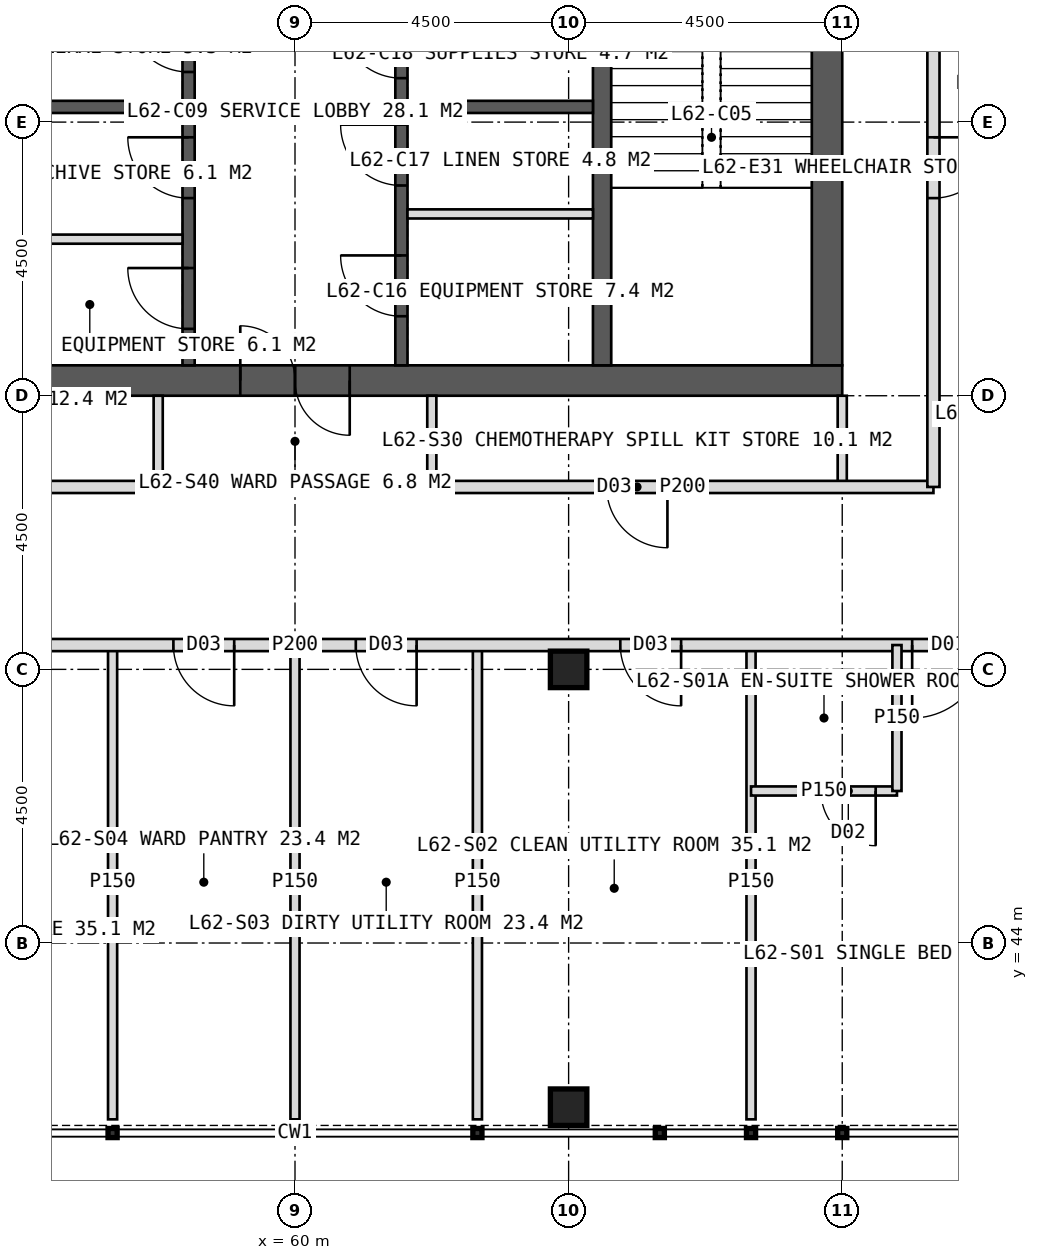
"""IFC4 building model, lengths in metres.
Left out: names, types, materials, properties, quantities, classifications, styles, units other than length and angle.
Written with IfcOpenShell. Run it as: python <this file> out.ifc"""

import sys

from ifc_helpers import new_model, si_unit, direction, frame, frame_2d, origin, origin_2d, place, context, subcontext, project, spatial, rectangle, hollow_rectangle, extrude, element, fill, save


model = new_model("IFC4")
c1 = context("Model", 3, precision=1e-05, world=origin(), true_north=direction((0.0, 1.0)))
c2 = subcontext(c1, "Body", "Model", "MODEL_VIEW")
j1 = project(units=[si_unit("LENGTHUNIT", "METRE"), si_unit("PLANEANGLEUNIT", "RADIAN")], contexts=[c1])
p1 = place(None, origin())
s1 = spatial("IfcSite", under=j1, at=p1, CompositionType="ELEMENT")
p2 = place(p1, origin())
s2 = spatial("IfcBuilding", under=s1, at=p2, CompositionType="ELEMENT")
p3 = place(p2, frame((0.0, 0.0, 258.0)))
s3 = spatial("IfcBuildingStorey", under=s2, at=p3, CompositionType="ELEMENT", Elevation=258.0)
p4 = place(p3, frame((51.0, 53.25, 0.0), z_axis=(0.0, 0.0, 1.0), x_axis=(1.0, 0.0, 0.0)))
e1 = element("IfcWall", 1, at=p4, inside=s3, PredefinedType="SHEAR", context=c2, shape_type="SweptSolid", body=[
    extrude(rectangle(XDim=18.0, YDim=0.5, at=frame_2d((9.0, 0.0))), origin(), (0.0, 0.0, 1.0), 4.0),
])
p5 = place(p4, frame((8.1, 0.0, 0.0)))
e2 = element("IfcOpeningElement", 2, at=p5, cuts=e1, PredefinedType="OPENING", context=c2, shape_type="SweptSolid", body=[
    extrude(rectangle(XDim=1.8, YDim=2.2, at=frame_2d((0.9, 1.1))), frame((0.0, 0.26, 0.0), z_axis=(0.0, -1.0, 0.0), x_axis=(1.0, 0.0, 0.0)), (0.0, 0.0, 1.0), 0.52),
])
p6 = place(p3, frame((68.75, 53.5, 0.0), z_axis=(0.0, 0.0, 1.0), x_axis=(0.0, 1.0, 0.0)))
e3 = element("IfcWall", 3, at=p6, inside=s3, PredefinedType="SHEAR", context=c2, shape_type="SweptSolid", body=[
    extrude(rectangle(XDim=17.0, YDim=0.5, at=frame_2d((8.5, 0.0))), origin(), (0.0, 0.0, 1.0), 4.0),
])
p7 = place(p6, frame((9.6, 0.0, 0.0)))
e4 = element("IfcOpeningElement", 4, at=p7, cuts=e3, PredefinedType="OPENING", context=c2, shape_type="SweptSolid", body=[
    extrude(rectangle(XDim=1.5, YDim=2.2, at=frame_2d((0.75, 1.1))), frame((0.0, 0.26, 0.0), z_axis=(0.0, -1.0, 0.0), x_axis=(1.0, 0.0, 0.0)), (0.0, 0.0, 1.0), 0.52),
])
p8 = place(p3, frame((65.05, 53.5, 0.0), z_axis=(0.0, 0.0, 1.0), x_axis=(0.0, 1.0, 0.0)))
e5 = element("IfcWall", 5, at=p8, inside=s3, PredefinedType="SHEAR", context=c2, shape_type="SweptSolid", body=[
    extrude(rectangle(XDim=17.0, YDim=0.3, at=frame_2d((8.5, 0.0))), origin(), (0.0, 0.0, 1.0), 4.0),
])
p9 = place(p3, frame((58.25, 53.5, 0.0), z_axis=(0.0, 0.0, 1.0), x_axis=(0.0, 1.0, 0.0)))
e6 = element("IfcWall", 6, at=p9, inside=s3, PredefinedType="SHEAR", context=c2, shape_type="SweptSolid", body=[
    extrude(rectangle(XDim=17.0, YDim=0.2, at=frame_2d((8.5, 0.0))), origin(), (0.0, 0.0, 1.0), 4.0),
])
p10 = place(p9, frame((0.6, 0.0, 0.0)))
e7 = element("IfcOpeningElement", 7, at=p10, cuts=e6, PredefinedType="OPENING", context=c2, shape_type="SweptSolid", body=[
    extrude(rectangle(XDim=1.0, YDim=2.1, at=frame_2d((0.5, 1.05))), frame((0.0, 0.11, 0.0), z_axis=(0.0, -1.0, 0.0), x_axis=(1.0, 0.0, 0.0)), (0.0, 0.0, 1.0), 0.22),
])
p11 = place(p9, frame((2.75, 0.0, 0.0)))
e8 = element("IfcOpeningElement", 8, at=p11, cuts=e6, PredefinedType="OPENING", context=c2, shape_type="SweptSolid", body=[
    extrude(rectangle(XDim=1.0, YDim=2.1, at=frame_2d((0.5, 1.05))), frame((0.0, 0.11, 0.0), z_axis=(0.0, -1.0, 0.0), x_axis=(1.0, 0.0, 0.0)), (0.0, 0.0, 1.0), 0.22),
])
p12 = place(p9, frame((4.824, 0.0, 0.0)))
e9 = element("IfcOpeningElement", 9, at=p12, cuts=e6, PredefinedType="OPENING", context=c2, shape_type="SweptSolid", body=[
    extrude(rectangle(XDim=1.0, YDim=2.1, at=frame_2d((0.5, 1.05))), frame((0.0, 0.11, 0.0), z_axis=(0.0, -1.0, 0.0), x_axis=(1.0, 0.0, 0.0)), (0.0, 0.0, 1.0), 0.22),
])
p13 = place(p9, frame((6.924, 0.0, 0.0)))
e10 = element("IfcOpeningElement", 10, at=p13, cuts=e6, PredefinedType="OPENING", context=c2, shape_type="SweptSolid", body=[
    extrude(rectangle(XDim=1.0, YDim=2.1, at=frame_2d((0.5, 1.05))), frame((0.0, 0.11, 0.0), z_axis=(0.0, -1.0, 0.0), x_axis=(1.0, 0.0, 0.0)), (0.0, 0.0, 1.0), 0.22),
])
p14 = place(p9, frame((10.025, 0.0, 0.0)))
e11 = element("IfcOpeningElement", 11, at=p14, cuts=e6, PredefinedType="OPENING", context=c2, shape_type="SweptSolid", body=[
    extrude(rectangle(XDim=1.4, YDim=2.2, at=frame_2d((0.7, 1.1))), frame((0.0, 0.11, 0.0), z_axis=(0.0, -1.0, 0.0), x_axis=(1.0, 0.0, 0.0)), (0.0, 0.0, 1.0), 0.22),
])
p15 = place(p9, frame((14.325, 0.0, 0.0)))
e12 = element("IfcOpeningElement", 12, at=p15, cuts=e6, PredefinedType="OPENING", context=c2, shape_type="SweptSolid", body=[
    extrude(rectangle(XDim=1.4, YDim=2.2, at=frame_2d((0.7, 1.1))), frame((0.0, 0.11, 0.0), z_axis=(0.0, -1.0, 0.0), x_axis=(1.0, 0.0, 0.0)), (0.0, 0.0, 1.0), 0.22),
])
p16 = place(p3, frame((61.75, 53.5, 0.0), z_axis=(0.0, 0.0, 1.0), x_axis=(0.0, 1.0, 0.0)))
e13 = element("IfcWall", 13, at=p16, inside=s3, PredefinedType="SHEAR", context=c2, shape_type="SweptSolid", body=[
    extrude(rectangle(XDim=17.0, YDim=0.2, at=frame_2d((8.5, 0.0))), origin(), (0.0, 0.0, 1.0), 4.0),
])
p17 = place(p16, frame((0.808, 0.0, 0.0)))
e14 = element("IfcOpeningElement", 14, at=p17, cuts=e13, PredefinedType="OPENING", context=c2, shape_type="SweptSolid", body=[
    extrude(rectangle(XDim=1.0, YDim=2.1, at=frame_2d((0.5, 1.05))), frame((0.0, 0.11, 0.0), z_axis=(0.0, -1.0, 0.0), x_axis=(1.0, 0.0, 0.0)), (0.0, 0.0, 1.0), 0.22),
])
p18 = place(p16, frame((2.958, 0.0, 0.0)))
e15 = element("IfcOpeningElement", 15, at=p18, cuts=e13, PredefinedType="OPENING", context=c2, shape_type="SweptSolid", body=[
    extrude(rectangle(XDim=1.0, YDim=2.1, at=frame_2d((0.5, 1.05))), frame((0.0, 0.11, 0.0), z_axis=(0.0, -1.0, 0.0), x_axis=(1.0, 0.0, 0.0)), (0.0, 0.0, 1.0), 0.22),
])
p19 = place(p16, frame((4.722, 0.0, 0.0)))
e16 = element("IfcOpeningElement", 16, at=p19, cuts=e13, PredefinedType="OPENING", context=c2, shape_type="SweptSolid", body=[
    extrude(rectangle(XDim=1.0, YDim=2.1, at=frame_2d((0.5, 1.05))), frame((0.0, 0.11, 0.0), z_axis=(0.0, -1.0, 0.0), x_axis=(1.0, 0.0, 0.0)), (0.0, 0.0, 1.0), 0.22),
])
p20 = place(p16, frame((6.823, 0.0, 0.0)))
e17 = element("IfcOpeningElement", 17, at=p20, cuts=e13, PredefinedType="OPENING", context=c2, shape_type="SweptSolid", body=[
    extrude(rectangle(XDim=1.0, YDim=2.1, at=frame_2d((0.5, 1.05))), frame((0.0, 0.11, 0.0), z_axis=(0.0, -1.0, 0.0), x_axis=(1.0, 0.0, 0.0)), (0.0, 0.0, 1.0), 0.22),
])
p21 = place(p16, frame((10.025, 0.0, 0.0)))
e18 = element("IfcOpeningElement", 18, at=p21, cuts=e13, PredefinedType="OPENING", context=c2, shape_type="SweptSolid", body=[
    extrude(rectangle(XDim=1.4, YDim=2.2, at=frame_2d((0.7, 1.1))), frame((0.0, 0.11, 0.0), z_axis=(0.0, -1.0, 0.0), x_axis=(1.0, 0.0, 0.0)), (0.0, 0.0, 1.0), 0.22),
])
p22 = place(p16, frame((14.325, 0.0, 0.0)))
e19 = element("IfcOpeningElement", 19, at=p22, cuts=e13, PredefinedType="OPENING", context=c2, shape_type="SweptSolid", body=[
    extrude(rectangle(XDim=1.4, YDim=2.2, at=frame_2d((0.7, 1.1))), frame((0.0, 0.11, 0.0), z_axis=(0.0, -1.0, 0.0), x_axis=(1.0, 0.0, 0.0)), (0.0, 0.0, 1.0), 0.22),
])
for number, where, z_axis, x_axis in (
    (20, (55.1, 57.75, 0.0), (0.0, 0.0, 1.0), (1.0, 0.0, 0.0)),
    (21, (61.85, 57.75, 0.0), (0.0, 0.0, 1.0), (1.0, 0.0, 0.0)),
):
    element("IfcWall", number, at=place(p3, frame(where, z_axis=z_axis, x_axis=x_axis)), inside=s3, PredefinedType="SHEAR", context=c2, shape_type="SweptSolid", body=[
        extrude(rectangle(XDim=3.05, YDim=0.2, at=frame_2d((1.525, 0.0))), origin(), (0.0, 0.0, 1.0), 4.0),
    ])
for number, where, z_axis, x_axis in (
    (22, (64.5, 48.5, 0.0), (0.0, 0.0, 1.0), (1.0, 0.0, 0.0)),
    (23, (64.5, 41.3, 0.0), (0.0, 0.0, 1.0), (1.0, 0.0, 0.0)),
):
    element("IfcColumn", number, at=place(p3, frame(where, z_axis=z_axis, x_axis=x_axis)), inside=s3, PredefinedType="COLUMN", context=c2, shape_type="SweptSolid", body=[
        extrude(hollow_rectangle(XDim=0.6, YDim=0.6, WallThickness=0.04, at=origin_2d()), origin(), (0.0, 0.0, 1.0), 4.0),
    ])
for number, where, z_axis, x_axis in (
    (24, (67.5, 48.9, 0.0), (0.0, 0.0, 1.0), (0.0, -1.0, 0.0)),
    (25, (63.0, 48.9, 0.0), (0.0, 0.0, 1.0), (0.0, -1.0, 0.0)),
):
    element("IfcWall", number, at=place(p3, frame(where, z_axis=z_axis, x_axis=x_axis)), inside=s3, PredefinedType="PARTITIONING", context=c2, shape_type="SweptSolid", body=[
        extrude(rectangle(XDim=7.8, YDim=0.15, at=frame_2d((3.9, 0.0))), origin(), (0.0, 0.0, 1.0), 3.75),
    ])
p23 = place(p3, frame((60.0, 48.9, 0.0), z_axis=(0.0, 0.0, 1.0), x_axis=(0.0, -1.0, 0.0)))
e26 = element("IfcWall", 26, at=p23, inside=s3, PredefinedType="PARTITIONING", context=c2, shape_type="SweptSolid", body=[
    extrude(rectangle(XDim=7.8, YDim=0.15, at=frame_2d((3.9, 0.0))), origin(), (0.0, 0.0, 1.0), 2.75),
])
p24 = place(p3, frame((57.0, 48.9, 0.0), z_axis=(0.0, 0.0, 1.0), x_axis=(0.0, -1.0, 0.0)))
e27 = element("IfcWall", 27, at=p24, inside=s3, PredefinedType="PARTITIONING", context=c2, shape_type="SweptSolid", body=[
    extrude(rectangle(XDim=7.8, YDim=0.15, at=frame_2d((3.9, 0.0))), origin(), (0.0, 0.0, 1.0), 3.75),
])
p25 = place(p3, frame((73.1, 48.9, 0.0), z_axis=(0.0, 0.0, 1.0), x_axis=(-1.0, 0.0, 0.0)))
e28 = element("IfcWall", 28, at=p25, inside=s3, PredefinedType="PARTITIONING", context=c2, shape_type="SweptSolid", body=[
    extrude(rectangle(XDim=26.2, YDim=0.2, at=frame_2d((13.1, 0.0))), origin(), (0.0, 0.0, 1.0), 3.75),
])
p26 = place(p25, frame((1.75, 0.0, 0.0)))
e29 = element("IfcOpeningElement", 29, at=p26, cuts=e28, PredefinedType="OPENING", context=c2, shape_type="SweptSolid", body=[
    extrude(rectangle(XDim=1.2, YDim=2.2, at=frame_2d((0.6, 1.1))), frame((0.0, 0.11, 0.0), z_axis=(0.0, -1.0, 0.0), x_axis=(1.0, 0.0, 0.0)), (0.0, 0.0, 1.0), 0.22),
])
p27 = place(p25, frame((6.75, 0.0, 0.0)))
e30 = element("IfcOpeningElement", 30, at=p27, cuts=e28, PredefinedType="OPENING", context=c2, shape_type="SweptSolid", body=[
    extrude(rectangle(XDim=1.0, YDim=2.1, at=frame_2d((0.5, 1.05))), frame((0.0, 0.11, 0.0), z_axis=(0.0, -1.0, 0.0), x_axis=(1.0, 0.0, 0.0)), (0.0, 0.0, 1.0), 0.22),
])
p28 = place(p25, frame((11.1, 0.0, 0.0)))
e31 = element("IfcOpeningElement", 31, at=p28, cuts=e28, PredefinedType="OPENING", context=c2, shape_type="SweptSolid", body=[
    extrude(rectangle(XDim=1.0, YDim=2.1, at=frame_2d((0.5, 1.05))), frame((0.0, 0.11, 0.0), z_axis=(0.0, -1.0, 0.0), x_axis=(1.0, 0.0, 0.0)), (0.0, 0.0, 1.0), 0.22),
])
p29 = place(p25, frame((14.1, 0.0, 0.0)))
e32 = element("IfcOpeningElement", 32, at=p29, cuts=e28, PredefinedType="OPENING", context=c2, shape_type="SweptSolid", body=[
    extrude(rectangle(XDim=1.0, YDim=2.1, at=frame_2d((0.5, 1.05))), frame((0.0, 0.11, 0.0), z_axis=(0.0, -1.0, 0.0), x_axis=(1.0, 0.0, 0.0)), (0.0, 0.0, 1.0), 0.22),
])
p30 = place(p25, frame((18.45, 0.0, 0.0)))
e33 = element("IfcOpeningElement", 33, at=p30, cuts=e28, PredefinedType="OPENING", context=c2, shape_type="SweptSolid", body=[
    extrude(rectangle(XDim=1.0, YDim=2.1, at=frame_2d((0.5, 1.05))), frame((0.0, 0.11, 0.0), z_axis=(0.0, -1.0, 0.0), x_axis=(1.0, 0.0, 0.0)), (0.0, 0.0, 1.0), 0.22),
])
p31 = place(p25, frame((22.9, 0.0, 0.0)))
e34 = element("IfcOpeningElement", 34, at=p31, cuts=e28, PredefinedType="OPENING", context=c2, shape_type="SweptSolid", body=[
    extrude(rectangle(XDim=1.0, YDim=2.1, at=frame_2d((0.5, 1.05))), frame((0.0, 0.11, 0.0), z_axis=(0.0, -1.0, 0.0), x_axis=(1.0, 0.0, 0.0)), (0.0, 0.0, 1.0), 0.22),
])
p32 = place(p3, frame((69.9, 46.5, 0.0), z_axis=(0.0, 0.0, 1.0), x_axis=(-1.0, 0.0, 0.0)))
e35 = element("IfcWall", 35, at=p32, inside=s3, PredefinedType="PARTITIONING", context=c2, shape_type="SweptSolid", body=[
    extrude(rectangle(XDim=2.4, YDim=0.15, at=frame_2d((1.2, 0.0))), origin(), (0.0, 0.0, 1.0), 3.75),
])
p33 = place(p32, frame((0.35, 0.0, 0.0)))
e36 = element("IfcOpeningElement", 36, at=p33, cuts=e35, PredefinedType="OPENING", context=c2, shape_type="SweptSolid", body=[
    extrude(rectangle(XDim=0.9, YDim=2.1, at=frame_2d((0.45, 1.05))), frame((0.0, 0.085, 0.0), z_axis=(0.0, -1.0, 0.0), x_axis=(1.0, 0.0, 0.0)), (0.0, 0.0, 1.0), 0.17),
])
p34 = place(p3, frame((69.9, 48.9, 0.0), z_axis=(0.0, 0.0, 1.0), x_axis=(0.0, -1.0, 0.0)))
e37 = element("IfcWall", 37, at=p34, inside=s3, PredefinedType="PARTITIONING", context=c2, shape_type="SweptSolid", body=[
    extrude(rectangle(XDim=2.4, YDim=0.15, at=frame_2d((1.2, 0.0))), origin(), (0.0, 0.0, 1.0), 3.75),
])
p35 = place(p3, frame((69.0, 53.0, 0.0), z_axis=(0.0, 0.0, 1.0), x_axis=(0.0, -1.0, 0.0)))
e38 = element("IfcWall", 38, at=p35, inside=s3, PredefinedType="PARTITIONING", context=c2, shape_type="SweptSolid", body=[
    extrude(rectangle(XDim=1.5, YDim=0.15, at=frame_2d((0.75, 0.0))), origin(), (0.0, 0.0, 1.0), 3.75),
])
p36 = place(p3, frame((70.5, 51.5, 0.0), z_axis=(0.0, 0.0, 1.0), x_axis=(-1.0, 0.0, 0.0)))
e39 = element("IfcWall", 39, at=p36, inside=s3, PredefinedType="PARTITIONING", context=c2, shape_type="SweptSolid", body=[
    extrude(rectangle(XDim=8.25, YDim=0.2, at=frame_2d((4.125, 0.0))), origin(), (0.0, 0.0, 1.0), 3.75),
])
p37 = place(p36, frame((4.375, 0.0, 0.0)))
e40 = element("IfcOpeningElement", 40, at=p37, cuts=e39, PredefinedType="OPENING", context=c2, shape_type="SweptSolid", body=[
    extrude(rectangle(XDim=1.0, YDim=2.1, at=frame_2d((0.5, 1.05))), frame((0.0, 0.11, 0.0), z_axis=(0.0, -1.0, 0.0), x_axis=(1.0, 0.0, 0.0)), (0.0, 0.0, 1.0), 0.22),
])
p38 = place(p3, frame((57.75, 51.5, 0.0), z_axis=(0.0, 0.0, 1.0), x_axis=(-1.0, 0.0, 0.0)))
e41 = element("IfcWall", 41, at=p38, inside=s3, PredefinedType="PARTITIONING", context=c2, shape_type="SweptSolid", body=[
    extrude(rectangle(XDim=8.25, YDim=0.2, at=frame_2d((4.125, 0.0))), origin(), (0.0, 0.0, 1.0), 3.75),
])
p39 = place(p38, frame((3.625, 0.0, 0.0)))
e42 = element("IfcOpeningElement", 42, at=p39, cuts=e41, PredefinedType="OPENING", context=c2, shape_type="SweptSolid", body=[
    extrude(rectangle(XDim=1.0, YDim=2.1, at=frame_2d((0.5, 1.05))), frame((0.0, 0.11, 0.0), z_axis=(0.0, -1.0, 0.0), x_axis=(1.0, 0.0, 0.0)), (0.0, 0.0, 1.0), 0.22),
])
for number, where, z_axis, x_axis in (
    (43, (62.25, 53.0, 0.0), (0.0, 0.0, 1.0), (0.0, -1.0, 0.0)),
    (44, (57.75, 53.0, 0.0), (0.0, 0.0, 1.0), (0.0, -1.0, 0.0)),
):
    element("IfcWall", number, at=place(p3, frame(where, z_axis=z_axis, x_axis=x_axis)), inside=s3, PredefinedType="PARTITIONING", context=c2, shape_type="SweptSolid", body=[
        extrude(rectangle(XDim=1.5, YDim=0.15, at=frame_2d((0.75, 0.0))), origin(), (0.0, 0.0, 1.0), 3.75),
    ])
p40 = place(p3, frame((70.5, 62.0, 0.0), z_axis=(0.0, 0.0, 1.0), x_axis=(0.0, -1.0, 0.0)))
e45 = element("IfcWall", 45, at=p40, inside=s3, PredefinedType="PARTITIONING", context=c2, shape_type="SweptSolid", body=[
    extrude(rectangle(XDim=10.5, YDim=0.2, at=frame_2d((5.25, 0.0))), origin(), (0.0, 0.0, 1.0), 3.75),
])
p41 = place(p40, frame((4.75, 0.0, 0.0)))
e46 = element("IfcOpeningElement", 46, at=p41, cuts=e45, PredefinedType="OPENING", context=c2, shape_type="SweptSolid", body=[
    extrude(rectangle(XDim=1.0, YDim=2.1, at=frame_2d((0.5, 1.05))), frame((0.0, 0.11, 0.0), z_axis=(0.0, -1.0, 0.0), x_axis=(1.0, 0.0, 0.0)), (0.0, 0.0, 1.0), 0.22),
])
for number, where, z_axis, x_axis in (
    (47, (55.1, 55.575, 0.0), (0.0, 0.0, 1.0), (1.0, 0.0, 0.0)),
    (48, (61.85, 55.99, 0.0), (0.0, 0.0, 1.0), (1.0, 0.0, 0.0)),
):
    element("IfcWall", number, at=place(p3, frame(where, z_axis=z_axis, x_axis=x_axis)), inside=s3, PredefinedType="PARTITIONING", context=c2, shape_type="SweptSolid", body=[
        extrude(rectangle(XDim=3.05, YDim=0.15, at=frame_2d((1.525, 0.0))), origin(), (0.0, 0.0, 1.0), 3.75),
    ])
p42 = place(p26, origin())
e49 = element("IfcDoor", 49, at=p42, inside=s3, OperationType="SINGLE_SWING_RIGHT", PredefinedType="DOOR", context=c2, shape_type="SweptSolid", body=[
    extrude(rectangle(XDim=1.2, YDim=2.2, at=frame_2d((0.6, 1.1))), frame((0.0, 0.025, 0.0), z_axis=(0.0, -1.0, 0.0), x_axis=(1.0, 0.0, 0.0)), (0.0, 0.0, 1.0), 0.05),
])
fill(e29, e49)
p43 = place(p33, origin())
e50 = element("IfcDoor", 50, at=p43, inside=s3, OperationType="SINGLE_SWING_LEFT", PredefinedType="DOOR", context=c2, shape_type="SweptSolid", body=[
    extrude(rectangle(XDim=0.9, YDim=2.1, at=frame_2d((0.45, 1.05))), frame((0.0, 0.025, 0.0), z_axis=(0.0, -1.0, 0.0), x_axis=(1.0, 0.0, 0.0)), (0.0, 0.0, 1.0), 0.05),
])
fill(e36, e50)
p44 = place(p27, origin())
e51 = element("IfcDoor", 51, at=p44, inside=s3, OperationType="SINGLE_SWING_LEFT", PredefinedType="DOOR", context=c2, shape_type="SweptSolid", body=[
    extrude(rectangle(XDim=1.0, YDim=2.1, at=frame_2d((0.5, 1.05))), frame((0.0, 0.025, 0.0), z_axis=(0.0, -1.0, 0.0), x_axis=(1.0, 0.0, 0.0)), (0.0, 0.0, 1.0), 0.05),
])
fill(e30, e51)
p45 = place(p28, origin())
e52 = element("IfcDoor", 52, at=p45, inside=s3, OperationType="SINGLE_SWING_LEFT", PredefinedType="DOOR", context=c2, shape_type="SweptSolid", body=[
    extrude(rectangle(XDim=1.0, YDim=2.1, at=frame_2d((0.5, 1.05))), frame((0.0, 0.025, 0.0), z_axis=(0.0, -1.0, 0.0), x_axis=(1.0, 0.0, 0.0)), (0.0, 0.0, 1.0), 0.05),
])
fill(e31, e52)
p46 = place(p29, origin())
e53 = element("IfcDoor", 53, at=p46, inside=s3, OperationType="SINGLE_SWING_LEFT", PredefinedType="DOOR", context=c2, shape_type="SweptSolid", body=[
    extrude(rectangle(XDim=1.0, YDim=2.1, at=frame_2d((0.5, 1.05))), frame((0.0, 0.025, 0.0), z_axis=(0.0, -1.0, 0.0), x_axis=(1.0, 0.0, 0.0)), (0.0, 0.0, 1.0), 0.05),
])
fill(e32, e53)
p47 = place(p37, origin())
e54 = element("IfcDoor", 54, at=p47, inside=s3, OperationType="SINGLE_SWING_LEFT", PredefinedType="DOOR", context=c2, shape_type="SweptSolid", body=[
    extrude(rectangle(XDim=1.0, YDim=2.1, at=frame_2d((0.5, 1.05))), frame((0.0, 0.025, 0.0), z_axis=(0.0, -1.0, 0.0), x_axis=(1.0, 0.0, 0.0)), (0.0, 0.0, 1.0), 0.05),
])
fill(e40, e54)
p48 = place(p41, origin())
e55 = element("IfcDoor", 55, at=p48, inside=s3, OperationType="SINGLE_SWING_LEFT", PredefinedType="DOOR", context=c2, shape_type="SweptSolid", body=[
    extrude(rectangle(XDim=1.0, YDim=2.1, at=frame_2d((0.5, 1.05))), frame((0.0, 0.025, 0.0), z_axis=(0.0, -1.0, 0.0), x_axis=(1.0, 0.0, 0.0)), (0.0, 0.0, 1.0), 0.05),
])
fill(e46, e55)
p49 = place(p10, origin())
e56 = element("IfcDoor", 56, at=p49, inside=s3, OperationType="SINGLE_SWING_RIGHT", PredefinedType="DOOR", context=c2, shape_type="SweptSolid", body=[
    extrude(rectangle(XDim=1.0, YDim=2.1, at=frame_2d((0.5, 1.05))), frame((0.0, 0.025, 0.0), z_axis=(0.0, -1.0, 0.0), x_axis=(1.0, 0.0, 0.0)), (0.0, 0.0, 1.0), 0.05),
])
fill(e7, e56)
p50 = place(p11, origin())
e57 = element("IfcDoor", 57, at=p50, inside=s3, OperationType="SINGLE_SWING_RIGHT", PredefinedType="DOOR", context=c2, shape_type="SweptSolid", body=[
    extrude(rectangle(XDim=1.0, YDim=2.1, at=frame_2d((0.5, 1.05))), frame((0.0, 0.025, 0.0), z_axis=(0.0, -1.0, 0.0), x_axis=(1.0, 0.0, 0.0)), (0.0, 0.0, 1.0), 0.05),
])
fill(e8, e57)
p51 = place(p17, origin())
e58 = element("IfcDoor", 58, at=p51, inside=s3, OperationType="SINGLE_SWING_RIGHT", PredefinedType="DOOR", context=c2, shape_type="SweptSolid", body=[
    extrude(rectangle(XDim=1.0, YDim=2.1, at=frame_2d((0.5, 1.05))), frame((0.0, 0.025, 0.0), z_axis=(0.0, -1.0, 0.0), x_axis=(1.0, 0.0, 0.0)), (0.0, 0.0, 1.0), 0.05),
])
fill(e14, e58)
p52 = place(p18, origin())
e59 = element("IfcDoor", 59, at=p52, inside=s3, OperationType="SINGLE_SWING_RIGHT", PredefinedType="DOOR", context=c2, shape_type="SweptSolid", body=[
    extrude(rectangle(XDim=1.0, YDim=2.1, at=frame_2d((0.5, 1.05))), frame((0.0, 0.025, 0.0), z_axis=(0.0, -1.0, 0.0), x_axis=(1.0, 0.0, 0.0)), (0.0, 0.0, 1.0), 0.05),
])
fill(e15, e59)
p53 = place(p12, origin())
e60 = element("IfcDoor", 60, at=p53, inside=s3, OperationType="SINGLE_SWING_RIGHT", PredefinedType="DOOR", context=c2, shape_type="SweptSolid", body=[
    extrude(rectangle(XDim=1.0, YDim=2.1, at=frame_2d((0.5, 1.05))), frame((0.0, 0.025, 0.0), z_axis=(0.0, -1.0, 0.0), x_axis=(1.0, 0.0, 0.0)), (0.0, 0.0, 1.0), 0.05),
])
fill(e9, e60)
p54 = place(p19, origin())
e61 = element("IfcDoor", 61, at=p54, inside=s3, OperationType="SINGLE_SWING_RIGHT", PredefinedType="DOOR", context=c2, shape_type="SweptSolid", body=[
    extrude(rectangle(XDim=1.0, YDim=2.1, at=frame_2d((0.5, 1.05))), frame((0.0, 0.025, 0.0), z_axis=(0.0, -1.0, 0.0), x_axis=(1.0, 0.0, 0.0)), (0.0, 0.0, 1.0), 0.05),
])
fill(e16, e61)
p55 = place(p5, origin())
e62 = element("IfcDoor", 62, at=p55, inside=s3, OperationType="DOUBLE_DOOR_SINGLE_SWING", PredefinedType="DOOR", context=c2, shape_type="SweptSolid", body=[
    extrude(rectangle(XDim=1.8, YDim=2.2, at=frame_2d((0.9, 1.1))), frame((0.0, 0.025, 0.0), z_axis=(0.0, -1.0, 0.0), x_axis=(1.0, 0.0, 0.0)), (0.0, 0.0, 1.0), 0.05),
])
fill(e2, e62)
save(model, sys.argv[1])
